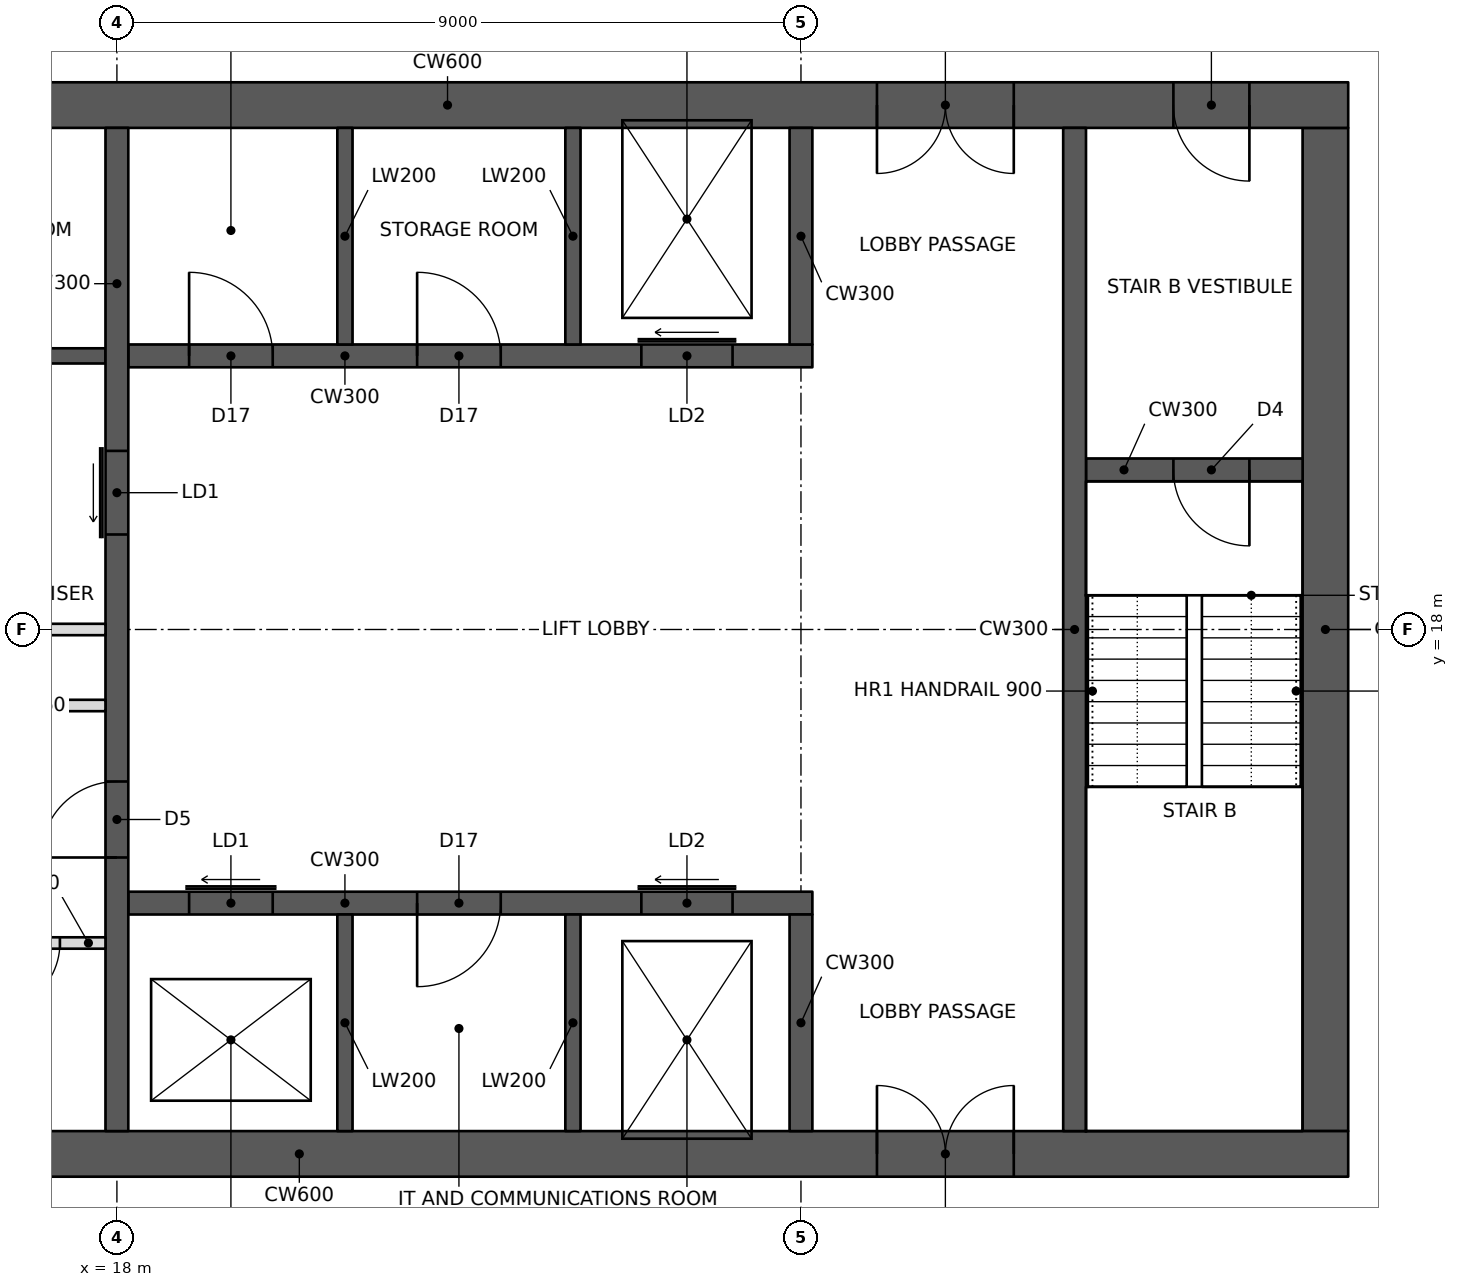
"""IFC4 building model, lengths in metres.
Left out: names, types, materials, properties, quantities, classifications, styles, units other than length and angle.
Written with IfcOpenShell. Run it as: python <this file> out.ifc"""

import sys

from ifc_helpers import new_model, si_unit, direction, frame, frame_2d, origin, place, context, subcontext, project, spatial, rectangle, extrude, element, fill, save


model = new_model("IFC4")
c1 = context("Model", 3, precision=1e-05, world=origin(), true_north=direction((0.0, 1.0)))
c2 = subcontext(c1, "Body", "Model", "MODEL_VIEW")
j1 = project(units=[si_unit("LENGTHUNIT", "METRE"), si_unit("PLANEANGLEUNIT", "RADIAN")], contexts=[c1])
p1 = place(None, origin())
s1 = spatial("IfcSite", under=j1, at=p1, CompositionType="ELEMENT")
p2 = place(p1, origin())
s2 = spatial("IfcBuilding", under=s1, at=p2, CompositionType="ELEMENT")
p3 = place(p2, frame((0.0, 0.0, 170.6)))
s3 = spatial("IfcBuildingStorey", under=s2, at=p3, CompositionType="ELEMENT", Elevation=170.6)
p4 = place(p3, frame((10.8, 11.1, 0.0), z_axis=(0.0, 0.0, 1.0), x_axis=(1.0, 0.0, 0.0)))
e1 = element("IfcWall", 1, at=p4, inside=s3, PredefinedType="SHEAR", context=c2, shape_type="SweptSolid", body=[
    extrude(rectangle(XDim=23.4, YDim=0.6, at=frame_2d((11.7, 0.0))), origin(), (0.0, 0.0, 1.0), 3.4),
])
p5 = place(p4, frame((1.0, 0.0, 0.0)))
e2 = element("IfcOpeningElement", 2, at=p5, cuts=e1, PredefinedType="OPENING", context=c2, shape_type="SweptSolid", body=[
    extrude(rectangle(XDim=1.0, YDim=2.1, at=frame_2d((0.5, 1.05))), frame((0.0, 0.31, 0.0), z_axis=(0.0, -1.0, 0.0), x_axis=(1.0, 0.0, 0.0)), (0.0, 0.0, 1.0), 0.62),
])
p6 = place(p4, frame((17.2, 0.0, 0.0)))
e3 = element("IfcOpeningElement", 3, at=p6, cuts=e1, PredefinedType="OPENING", context=c2, shape_type="SweptSolid", body=[
    extrude(rectangle(XDim=1.8, YDim=2.1, at=frame_2d((0.9, 1.05))), frame((0.0, 0.31, 0.0), z_axis=(0.0, -1.0, 0.0), x_axis=(1.0, 0.0, 0.0)), (0.0, 0.0, 1.0), 0.62),
])
p7 = place(p3, frame((10.8, 24.9, 0.0), z_axis=(0.0, 0.0, 1.0), x_axis=(1.0, 0.0, 0.0)))
e4 = element("IfcWall", 4, at=p7, inside=s3, PredefinedType="SHEAR", context=c2, shape_type="SweptSolid", body=[
    extrude(rectangle(XDim=23.4, YDim=0.6, at=frame_2d((11.7, 0.0))), origin(), (0.0, 0.0, 1.0), 3.4),
])
p8 = place(p7, frame((17.2, 0.0, 0.0)))
e5 = element("IfcOpeningElement", 5, at=p8, cuts=e4, PredefinedType="OPENING", context=c2, shape_type="SweptSolid", body=[
    extrude(rectangle(XDim=1.8, YDim=2.1, at=frame_2d((0.9, 1.05))), frame((0.0, 0.31, 0.0), z_axis=(0.0, -1.0, 0.0), x_axis=(1.0, 0.0, 0.0)), (0.0, 0.0, 1.0), 0.62),
])
p9 = place(p7, frame((21.1, 0.0, 0.0)))
e6 = element("IfcOpeningElement", 6, at=p9, cuts=e4, PredefinedType="OPENING", context=c2, shape_type="SweptSolid", body=[
    extrude(rectangle(XDim=1.0, YDim=2.1, at=frame_2d((0.5, 1.05))), frame((0.0, 0.31, 0.0), z_axis=(0.0, -1.0, 0.0), x_axis=(1.0, 0.0, 0.0)), (0.0, 0.0, 1.0), 0.62),
])
p10 = place(p7, frame((4.9, 0.0, 0.0)))
e7 = element("IfcOpeningElement", 7, at=p10, cuts=e4, PredefinedType="OPENING", context=c2, shape_type="SweptSolid", body=[
    extrude(rectangle(XDim=1.0, YDim=2.1, at=frame_2d((0.5, 1.05))), frame((0.0, 0.31, 0.0), z_axis=(0.0, -1.0, 0.0), x_axis=(1.0, 0.0, 0.0)), (0.0, 0.0, 1.0), 0.62),
])
p11 = place(p3, frame((33.9, 11.4, 0.0), z_axis=(0.0, 0.0, 1.0), x_axis=(0.0, 1.0, 0.0)))
e8 = element("IfcWall", 8, at=p11, inside=s3, PredefinedType="SHEAR", context=c2, shape_type="SweptSolid", body=[
    extrude(rectangle(XDim=13.2, YDim=0.6, at=frame_2d((6.6, 0.0))), origin(), (0.0, 0.0, 1.0), 3.4),
])
p12 = place(p3, frame((18.0, 11.4, 0.0), z_axis=(0.0, 0.0, 1.0), x_axis=(0.0, 1.0, 0.0)))
e9 = element("IfcWall", 9, at=p12, inside=s3, PredefinedType="SHEAR", context=c2, shape_type="SweptSolid", body=[
    extrude(rectangle(XDim=13.2, YDim=0.3, at=frame_2d((6.6, 0.0))), origin(), (0.0, 0.0, 1.0), 3.4),
])
p13 = place(p12, frame((3.6, 0.0, 0.0)))
e10 = element("IfcOpeningElement", 10, at=p13, cuts=e9, PredefinedType="OPENING", context=c2, shape_type="SweptSolid", body=[
    extrude(rectangle(XDim=1.0, YDim=2.1, at=frame_2d((0.5, 1.05))), frame((0.0, 0.16, 0.0), z_axis=(0.0, -1.0, 0.0), x_axis=(1.0, 0.0, 0.0)), (0.0, 0.0, 1.0), 0.32),
])
p14 = place(p12, frame((7.85, 0.0, 0.0)))
e11 = element("IfcOpeningElement", 11, at=p14, cuts=e9, PredefinedType="OPENING", context=c2, shape_type="SweptSolid", body=[
    extrude(rectangle(XDim=1.1, YDim=2.1, at=frame_2d((0.55, 1.05))), frame((0.0, 0.16, 0.0), z_axis=(0.0, -1.0, 0.0), x_axis=(1.0, 0.0, 0.0)), (0.0, 0.0, 1.0), 0.32),
])
p15 = place(p3, frame((14.55, 18.0, 0.0), z_axis=(0.0, 0.0, 1.0), x_axis=(1.0, 0.0, 0.0)))
e12 = element("IfcWall", 12, at=p15, inside=s3, PredefinedType="PARTITIONING", context=c2, shape_type="SweptSolid", body=[
    extrude(rectangle(XDim=3.3, YDim=0.15, at=frame_2d((1.65, 0.0))), origin(), (0.0, 0.0, 1.0), 3.2),
])
p16 = place(p3, frame((18.15, 14.4, 0.0), z_axis=(0.0, 0.0, 1.0), x_axis=(1.0, 0.0, 0.0)))
e13 = element("IfcWall", 13, at=p16, inside=s3, PredefinedType="SHEAR", context=c2, shape_type="SweptSolid", body=[
    extrude(rectangle(XDim=9.0, YDim=0.3, at=frame_2d((4.5, 0.0))), origin(), (0.0, 0.0, 1.0), 3.4),
])
p17 = place(p16, frame((0.8, 0.0, 0.0)))
e14 = element("IfcOpeningElement", 14, at=p17, cuts=e13, PredefinedType="OPENING", context=c2, shape_type="SweptSolid", body=[
    extrude(rectangle(XDim=1.1, YDim=2.1, at=frame_2d((0.55, 1.05))), frame((0.0, 0.16, 0.0), z_axis=(0.0, -1.0, 0.0), x_axis=(1.0, 0.0, 0.0)), (0.0, 0.0, 1.0), 0.32),
])
p18 = place(p16, frame((6.75, 0.0, 0.0)))
e15 = element("IfcOpeningElement", 15, at=p18, cuts=e13, PredefinedType="OPENING", context=c2, shape_type="SweptSolid", body=[
    extrude(rectangle(XDim=1.2, YDim=2.1, at=frame_2d((0.6, 1.05))), frame((0.0, 0.16, 0.0), z_axis=(0.0, -1.0, 0.0), x_axis=(1.0, 0.0, 0.0)), (0.0, 0.0, 1.0), 0.32),
])
p19 = place(p16, frame((3.8, 0.0, 0.0)))
e16 = element("IfcOpeningElement", 16, at=p19, cuts=e13, PredefinedType="OPENING", context=c2, shape_type="SweptSolid", body=[
    extrude(rectangle(XDim=1.1, YDim=2.1, at=frame_2d((0.55, 1.05))), frame((0.0, 0.16, 0.0), z_axis=(0.0, -1.0, 0.0), x_axis=(1.0, 0.0, 0.0)), (0.0, 0.0, 1.0), 0.32),
])
p20 = place(p3, frame((27.0, 11.4, 0.0), z_axis=(0.0, 0.0, 1.0), x_axis=(0.0, 1.0, 0.0)))
e17 = element("IfcWall", 17, at=p20, inside=s3, PredefinedType="SHEAR", context=c2, shape_type="SweptSolid", body=[
    extrude(rectangle(XDim=2.85, YDim=0.3, at=frame_2d((1.425, 0.0))), origin(), (0.0, 0.0, 1.0), 3.4),
])
for number, where, z_axis, x_axis in (
    (18, (21.0, 11.4, 0.0), (0.0, 0.0, 1.0), (0.0, 1.0, 0.0)),
    (19, (24.0, 11.4, 0.0), (0.0, 0.0, 1.0), (0.0, 1.0, 0.0)),
):
    element("IfcWall", number, at=place(p3, frame(where, z_axis=z_axis, x_axis=x_axis)), inside=s3, PredefinedType="SHEAR", context=c2, shape_type="SweptSolid", body=[
        extrude(rectangle(XDim=2.85, YDim=0.2, at=frame_2d((1.425, 0.0))), origin(), (0.0, 0.0, 1.0), 3.4),
    ])
p21 = place(p3, frame((18.15, 21.6, 0.0), z_axis=(0.0, 0.0, 1.0), x_axis=(1.0, 0.0, 0.0)))
e20 = element("IfcWall", 20, at=p21, inside=s3, PredefinedType="SHEAR", context=c2, shape_type="SweptSolid", body=[
    extrude(rectangle(XDim=9.0, YDim=0.3, at=frame_2d((4.5, 0.0))), origin(), (0.0, 0.0, 1.0), 3.4),
])
p22 = place(p21, frame((6.75, 0.0, 0.0)))
e21 = element("IfcOpeningElement", 21, at=p22, cuts=e20, PredefinedType="OPENING", context=c2, shape_type="SweptSolid", body=[
    extrude(rectangle(XDim=1.2, YDim=2.1, at=frame_2d((0.6, 1.05))), frame((0.0, 0.16, 0.0), z_axis=(0.0, -1.0, 0.0), x_axis=(1.0, 0.0, 0.0)), (0.0, 0.0, 1.0), 0.32),
])
p23 = place(p21, frame((0.8, 0.0, 0.0)))
e22 = element("IfcOpeningElement", 22, at=p23, cuts=e20, PredefinedType="OPENING", context=c2, shape_type="SweptSolid", body=[
    extrude(rectangle(XDim=1.1, YDim=2.1, at=frame_2d((0.55, 1.05))), frame((0.0, 0.16, 0.0), z_axis=(0.0, -1.0, 0.0), x_axis=(1.0, 0.0, 0.0)), (0.0, 0.0, 1.0), 0.32),
])
p24 = place(p21, frame((3.8, 0.0, 0.0)))
e23 = element("IfcOpeningElement", 23, at=p24, cuts=e20, PredefinedType="OPENING", context=c2, shape_type="SweptSolid", body=[
    extrude(rectangle(XDim=1.1, YDim=2.1, at=frame_2d((0.55, 1.05))), frame((0.0, 0.16, 0.0), z_axis=(0.0, -1.0, 0.0), x_axis=(1.0, 0.0, 0.0)), (0.0, 0.0, 1.0), 0.32),
])
p25 = place(p3, frame((27.0, 21.75, 0.0), z_axis=(0.0, 0.0, 1.0), x_axis=(0.0, 1.0, 0.0)))
e24 = element("IfcWall", 24, at=p25, inside=s3, PredefinedType="SHEAR", context=c2, shape_type="SweptSolid", body=[
    extrude(rectangle(XDim=2.85, YDim=0.3, at=frame_2d((1.425, 0.0))), origin(), (0.0, 0.0, 1.0), 3.4),
])
for number, where, z_axis, x_axis in (
    (25, (21.0, 21.75, 0.0), (0.0, 0.0, 1.0), (0.0, 1.0, 0.0)),
    (26, (24.0, 21.75, 0.0), (0.0, 0.0, 1.0), (0.0, 1.0, 0.0)),
):
    element("IfcWall", number, at=place(p3, frame(where, z_axis=z_axis, x_axis=x_axis)), inside=s3, PredefinedType="SHEAR", context=c2, shape_type="SweptSolid", body=[
        extrude(rectangle(XDim=2.85, YDim=0.2, at=frame_2d((1.425, 0.0))), origin(), (0.0, 0.0, 1.0), 3.4),
    ])
p26 = place(p3, frame((30.6, 11.4, 0.0), z_axis=(0.0, 0.0, 1.0), x_axis=(0.0, 1.0, 0.0)))
e27 = element("IfcWall", 27, at=p26, inside=s3, PredefinedType="SHEAR", context=c2, shape_type="SweptSolid", body=[
    extrude(rectangle(XDim=13.2, YDim=0.3, at=frame_2d((6.6, 0.0))), origin(), (0.0, 0.0, 1.0), 3.4),
])
p27 = place(p3, frame((30.75, 20.1, 0.0), z_axis=(0.0, 0.0, 1.0), x_axis=(1.0, 0.0, 0.0)))
e28 = element("IfcWall", 28, at=p27, inside=s3, PredefinedType="SHEAR", context=c2, shape_type="SweptSolid", body=[
    extrude(rectangle(XDim=2.85, YDim=0.3, at=frame_2d((1.425, 0.0))), origin(), (0.0, 0.0, 1.0), 3.4),
])
p28 = place(p27, frame((1.15, 0.0, 0.0)))
e29 = element("IfcOpeningElement", 29, at=p28, cuts=e28, PredefinedType="OPENING", context=c2, shape_type="SweptSolid", body=[
    extrude(rectangle(XDim=1.0, YDim=2.1, at=frame_2d((0.5, 1.05))), frame((0.0, 0.16, 0.0), z_axis=(0.0, -1.0, 0.0), x_axis=(1.0, 0.0, 0.0)), (0.0, 0.0, 1.0), 0.32),
])
p29 = place(p3, frame((14.55, 21.6, 0.0), z_axis=(0.0, 0.0, 1.0), x_axis=(1.0, 0.0, 0.0)))
e30 = element("IfcWall", 30, at=p29, inside=s3, PredefinedType="SHEAR", context=c2, shape_type="SweptSolid", body=[
    extrude(rectangle(XDim=3.3, YDim=0.2, at=frame_2d((1.65, 0.0))), origin(), (0.0, 0.0, 1.0), 3.4),
])
p30 = place(p3, frame((14.55, 17.0, 0.0), z_axis=(0.0, 0.0, 1.0), x_axis=(1.0, 0.0, 0.0)))
e31 = element("IfcWall", 31, at=p30, inside=s3, PredefinedType="PARTITIONING", context=c2, shape_type="SweptSolid", body=[
    extrude(rectangle(XDim=3.3, YDim=0.15, at=frame_2d((1.65, 0.0))), origin(), (0.0, 0.0, 1.0), 3.2),
])
p31 = place(p30, frame((0.3, 0.0, 0.0)))
e32 = element("IfcOpeningElement", 32, at=p31, cuts=e31, PredefinedType="OPENING", context=c2, shape_type="SweptSolid", body=[
    extrude(rectangle(XDim=1.0, YDim=2.1, at=frame_2d((0.5, 1.05))), frame((0.0, 0.085, 0.0), z_axis=(0.0, -1.0, 0.0), x_axis=(1.0, 0.0, 0.0)), (0.0, 0.0, 1.0), 0.17),
])
p32 = place(p3, frame((14.55, 13.875, 0.0), z_axis=(0.0, 0.0, 1.0), x_axis=(1.0, 0.0, 0.0)))
e33 = element("IfcWall", 33, at=p32, inside=s3, PredefinedType="PARTITIONING", context=c2, shape_type="SweptSolid", body=[
    extrude(rectangle(XDim=3.3, YDim=0.15, at=frame_2d((1.65, 0.0))), origin(), (0.0, 0.0, 1.0), 3.2),
])
p33 = place(p32, frame((0.2, 0.0, 0.0)))
e34 = element("IfcOpeningElement", 34, at=p33, cuts=e33, PredefinedType="OPENING", context=c2, shape_type="SweptSolid", body=[
    extrude(rectangle(XDim=0.9, YDim=2.1, at=frame_2d((0.45, 1.05))), frame((0.0, 0.085, 0.0), z_axis=(0.0, -1.0, 0.0), x_axis=(1.0, 0.0, 0.0)), (0.0, 0.0, 1.0), 0.17),
])
p34 = place(p32, frame((1.8, 0.0, 0.0)))
e35 = element("IfcOpeningElement", 35, at=p34, cuts=e33, PredefinedType="OPENING", context=c2, shape_type="SweptSolid", body=[
    extrude(rectangle(XDim=0.9, YDim=2.1, at=frame_2d((0.45, 1.05))), frame((0.0, 0.085, 0.0), z_axis=(0.0, -1.0, 0.0), x_axis=(1.0, 0.0, 0.0)), (0.0, 0.0, 1.0), 0.17),
])
p35 = place(p34, frame((0.9, 0.0, 0.0), z_axis=(0.0, 0.0, 1.0), x_axis=(-1.0, 0.0, 0.0)))
e36 = element("IfcDoor", 36, at=p35, inside=s3, OperationType="SINGLE_SWING_RIGHT", PredefinedType="DOOR", context=c2, shape_type="SweptSolid", body=[
    extrude(rectangle(XDim=0.9, YDim=2.1, at=frame_2d((0.45, 1.05))), frame((0.0, 0.025, 0.0), z_axis=(0.0, -1.0, 0.0), x_axis=(1.0, 0.0, 0.0)), (0.0, 0.0, 1.0), 0.05),
])
fill(e35, e36)
p36 = place(p6, origin())
e37 = element("IfcDoor", 37, at=p36, inside=s3, OperationType="DOUBLE_DOOR_SINGLE_SWING", PredefinedType="DOOR", context=c2, shape_type="SweptSolid", body=[
    extrude(rectangle(XDim=1.8, YDim=2.1, at=frame_2d((0.9, 1.05))), frame((0.0, 0.025, 0.0), z_axis=(0.0, -1.0, 0.0), x_axis=(1.0, 0.0, 0.0)), (0.0, 0.0, 1.0), 0.05),
])
fill(e3, e37)
p37 = place(p8, frame((1.8, 0.0, 0.0), z_axis=(0.0, 0.0, 1.0), x_axis=(-1.0, 0.0, 0.0)))
e38 = element("IfcDoor", 38, at=p37, inside=s3, OperationType="DOUBLE_DOOR_SINGLE_SWING", PredefinedType="DOOR", context=c2, shape_type="SweptSolid", body=[
    extrude(rectangle(XDim=1.8, YDim=2.1, at=frame_2d((0.9, 1.05))), frame((0.0, 0.025, 0.0), z_axis=(0.0, -1.0, 0.0), x_axis=(1.0, 0.0, 0.0)), (0.0, 0.0, 1.0), 0.05),
])
fill(e5, e38)
p38 = place(p9, frame((1.0, 0.0, 0.0), z_axis=(0.0, 0.0, 1.0), x_axis=(-1.0, 0.0, 0.0)))
e39 = element("IfcDoor", 39, at=p38, inside=s3, OperationType="SINGLE_SWING_LEFT", PredefinedType="DOOR", context=c2, shape_type="SweptSolid", body=[
    extrude(rectangle(XDim=1.0, YDim=2.1, at=frame_2d((0.5, 1.05))), frame((0.0, 0.025, 0.0), z_axis=(0.0, -1.0, 0.0), x_axis=(1.0, 0.0, 0.0)), (0.0, 0.0, 1.0), 0.05),
])
fill(e6, e39)
p39 = place(p28, frame((1.0, 0.0, 0.0), z_axis=(0.0, 0.0, 1.0), x_axis=(-1.0, 0.0, 0.0)))
e40 = element("IfcDoor", 40, at=p39, inside=s3, OperationType="SINGLE_SWING_LEFT", PredefinedType="DOOR", context=c2, shape_type="SweptSolid", body=[
    extrude(rectangle(XDim=1.0, YDim=2.1, at=frame_2d((0.5, 1.05))), frame((0.0, 0.025, 0.0), z_axis=(0.0, -1.0, 0.0), x_axis=(1.0, 0.0, 0.0)), (0.0, 0.0, 1.0), 0.05),
])
fill(e29, e40)
p40 = place(p13, origin())
e41 = element("IfcDoor", 41, at=p40, inside=s3, OperationType="SINGLE_SWING_LEFT", PredefinedType="DOOR", context=c2, shape_type="SweptSolid", body=[
    extrude(rectangle(XDim=1.0, YDim=2.1, at=frame_2d((0.5, 1.05))), frame((0.0, 0.025, 0.0), z_axis=(0.0, -1.0, 0.0), x_axis=(1.0, 0.0, 0.0)), (0.0, 0.0, 1.0), 0.05),
])
fill(e10, e41)
p41 = place(p17, origin())
e42 = element("IfcDoor", 42, at=p41, inside=s3, OperationType="SLIDING_TO_LEFT", PredefinedType="DOOR", context=c2, shape_type="SweptSolid", body=[
    extrude(rectangle(XDim=1.1, YDim=2.1, at=frame_2d((0.55, 1.05))), frame((0.0, 0.025, 0.0), z_axis=(0.0, -1.0, 0.0), x_axis=(1.0, 0.0, 0.0)), (0.0, 0.0, 1.0), 0.05),
])
fill(e14, e42)
p42 = place(p14, origin())
e43 = element("IfcDoor", 43, at=p42, inside=s3, OperationType="SLIDING_TO_LEFT", PredefinedType="DOOR", context=c2, shape_type="SweptSolid", body=[
    extrude(rectangle(XDim=1.1, YDim=2.1, at=frame_2d((0.55, 1.05))), frame((0.0, 0.025, 0.0), z_axis=(0.0, -1.0, 0.0), x_axis=(1.0, 0.0, 0.0)), (0.0, 0.0, 1.0), 0.05),
])
fill(e11, e43)
p43 = place(p18, origin())
e44 = element("IfcDoor", 44, at=p43, inside=s3, OperationType="SLIDING_TO_LEFT", PredefinedType="DOOR", context=c2, shape_type="SweptSolid", body=[
    extrude(rectangle(XDim=1.2, YDim=2.1, at=frame_2d((0.6, 1.05))), frame((0.0, 0.025, 0.0), z_axis=(0.0, -1.0, 0.0), x_axis=(1.0, 0.0, 0.0)), (0.0, 0.0, 1.0), 0.05),
])
fill(e15, e44)
p44 = place(p22, origin())
e45 = element("IfcDoor", 45, at=p44, inside=s3, OperationType="SLIDING_TO_LEFT", PredefinedType="DOOR", context=c2, shape_type="SweptSolid", body=[
    extrude(rectangle(XDim=1.2, YDim=2.1, at=frame_2d((0.6, 1.05))), frame((0.0, 0.025, 0.0), z_axis=(0.0, -1.0, 0.0), x_axis=(1.0, 0.0, 0.0)), (0.0, 0.0, 1.0), 0.05),
])
fill(e21, e45)
p45 = place(p23, origin())
e46 = element("IfcDoor", 46, at=p45, inside=s3, OperationType="SINGLE_SWING_LEFT", PredefinedType="DOOR", context=c2, shape_type="SweptSolid", body=[
    extrude(rectangle(XDim=1.1, YDim=2.1, at=frame_2d((0.55, 1.05))), frame((0.0, 0.025, 0.0), z_axis=(0.0, -1.0, 0.0), x_axis=(1.0, 0.0, 0.0)), (0.0, 0.0, 1.0), 0.05),
])
fill(e22, e46)
p46 = place(p24, origin())
e47 = element("IfcDoor", 47, at=p46, inside=s3, OperationType="SINGLE_SWING_LEFT", PredefinedType="DOOR", context=c2, shape_type="SweptSolid", body=[
    extrude(rectangle(XDim=1.1, YDim=2.1, at=frame_2d((0.55, 1.05))), frame((0.0, 0.025, 0.0), z_axis=(0.0, -1.0, 0.0), x_axis=(1.0, 0.0, 0.0)), (0.0, 0.0, 1.0), 0.05),
])
fill(e23, e47)
p47 = place(p19, frame((1.1, 0.0, 0.0), z_axis=(0.0, 0.0, 1.0), x_axis=(-1.0, 0.0, 0.0)))
e48 = element("IfcDoor", 48, at=p47, inside=s3, OperationType="SINGLE_SWING_RIGHT", PredefinedType="DOOR", context=c2, shape_type="SweptSolid", body=[
    extrude(rectangle(XDim=1.1, YDim=2.1, at=frame_2d((0.55, 1.05))), frame((0.0, 0.025, 0.0), z_axis=(0.0, -1.0, 0.0), x_axis=(1.0, 0.0, 0.0)), (0.0, 0.0, 1.0), 0.05),
])
fill(e16, e48)
save(model, sys.argv[1])
